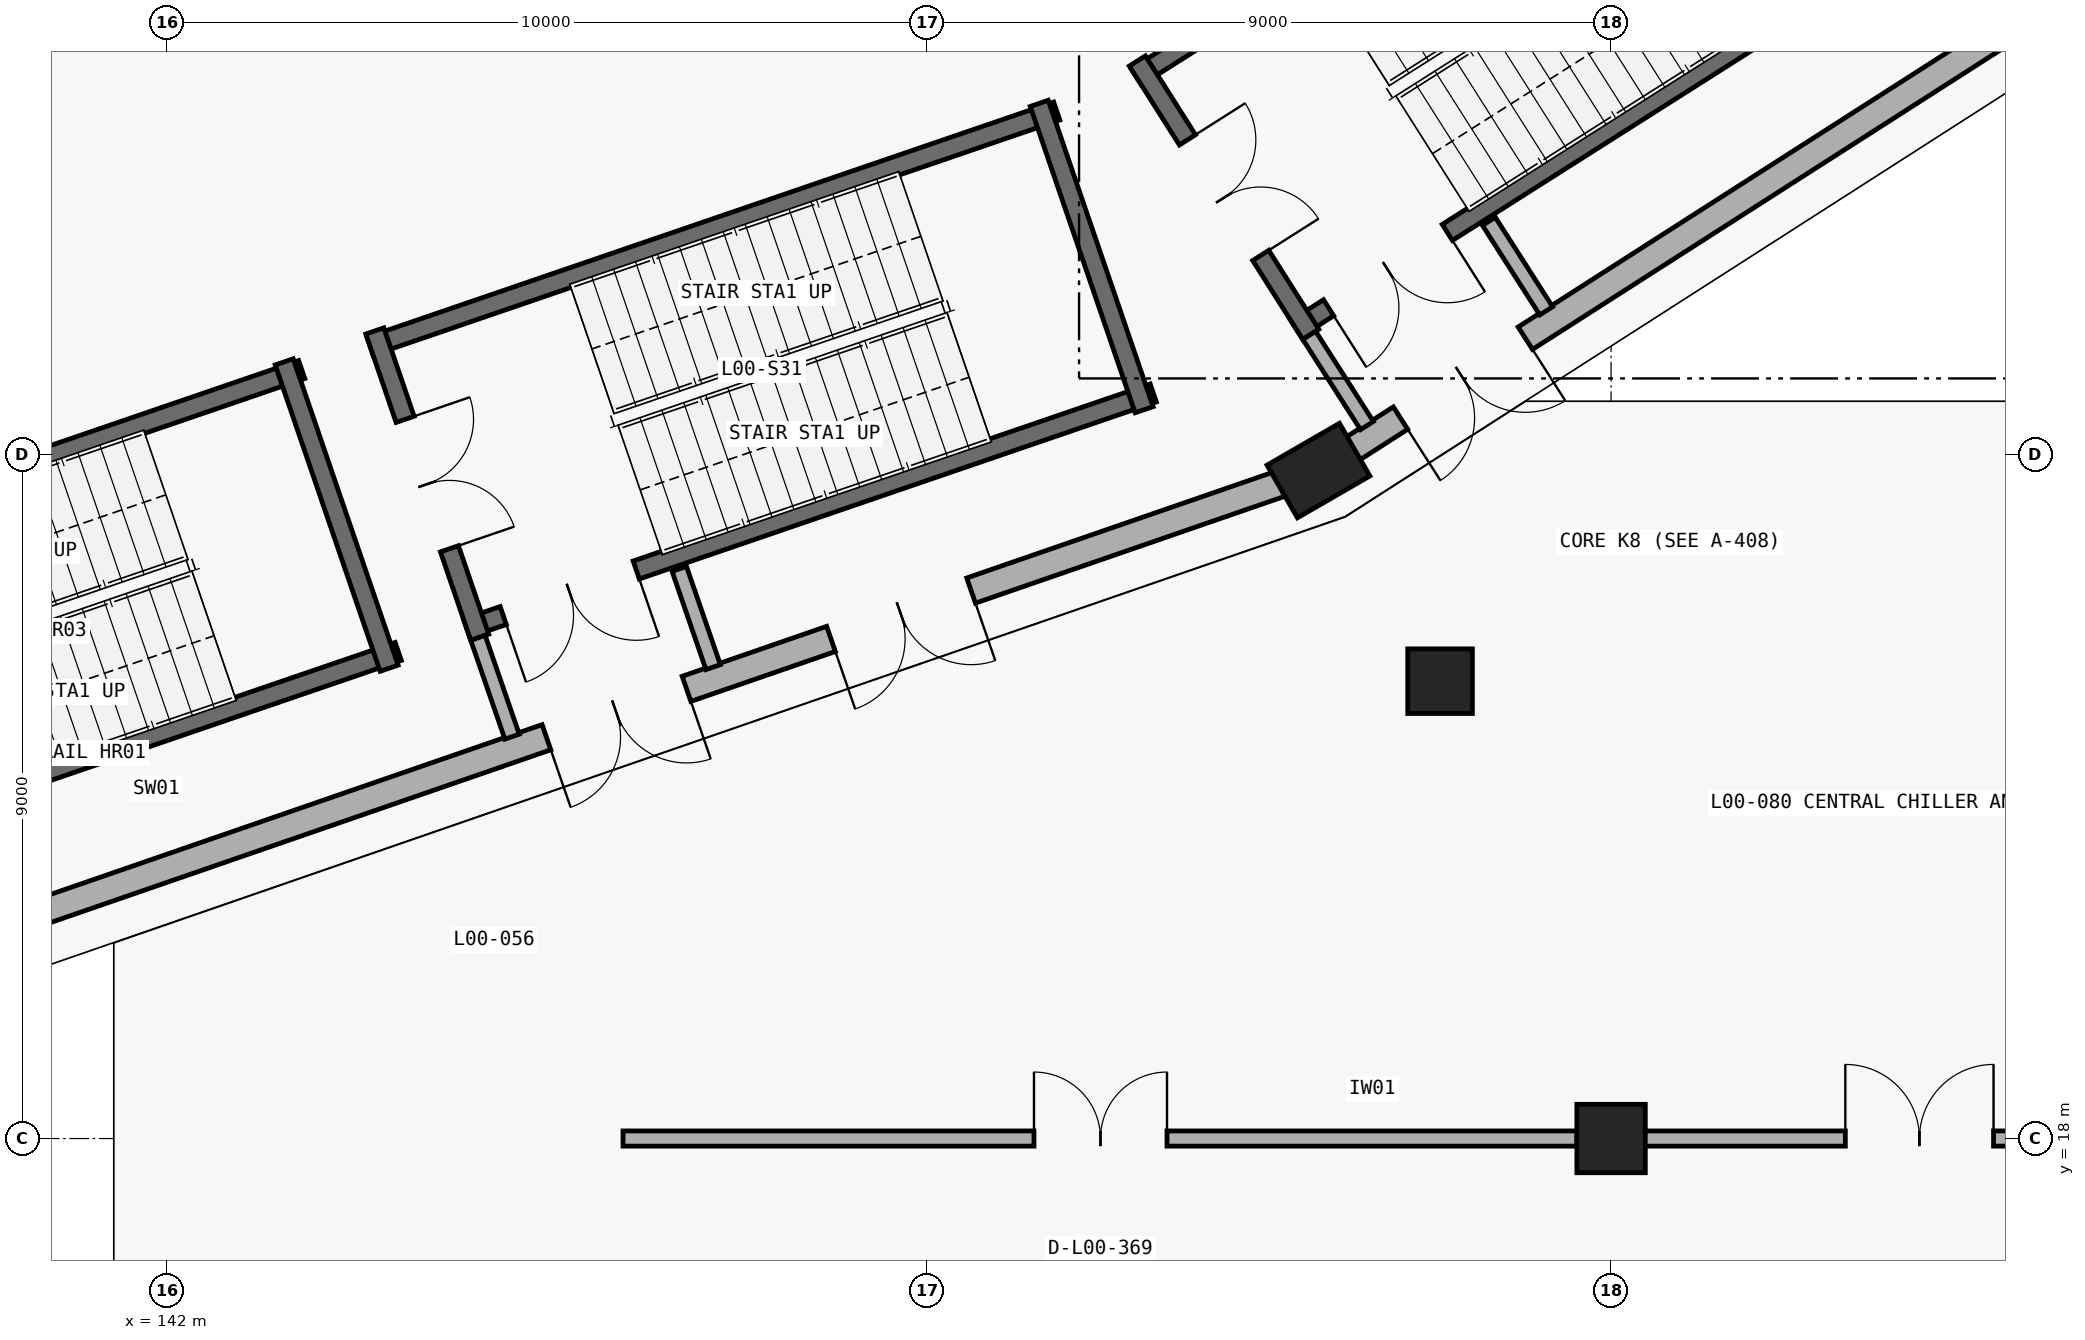
"""IFC4 building model, lengths in metres.
Left out: names, types, materials, properties, quantities, classifications, styles, units other than length and angle.
Written with IfcOpenShell. Run it as: python <this file> out.ifc"""

import sys

from ifc_helpers import new_model, si_unit, direction, frame, frame_2d, origin, origin_2d, place, context, subcontext, project, spatial, rectangle, circle, extrude, element, fill, save


model = new_model("IFC4")
c1 = context("Model", 3, precision=1e-05, world=origin(), true_north=direction((0.0, 1.0)))
c2 = subcontext(c1, "Body", "Model", "MODEL_VIEW")
j1 = project(units=[si_unit("LENGTHUNIT", "METRE"), si_unit("PLANEANGLEUNIT", "RADIAN")], contexts=[c1])
p1 = place(None, origin())
s1 = spatial("IfcSite", under=j1, at=p1, CompositionType="ELEMENT")
p2 = place(p1, origin())
s2 = spatial("IfcBuilding", under=s1, at=p2, CompositionType="ELEMENT")
p3 = place(p2, origin())
s3 = spatial("IfcBuildingStorey", under=s2, at=p3, CompositionType="ELEMENT", Elevation=0.0)
p4 = place(p3, frame((157.15, 26.788, 0.0), z_axis=(0.0, 0.0, 1.0), x_axis=(-0.5, 0.866025403784, 0.0)))
e1 = element("IfcColumn", 1, at=p4, inside=s3, PredefinedType="COLUMN", context=c2, shape_type="SweptSolid", body=[
    extrude(rectangle(XDim=0.8, YDim=1.1, at=origin_2d()), origin(), (0.0, 0.0, 1.0), 5.4),
])
p5 = place(p3, frame((158.75, 24.017, 0.0), z_axis=(0.0, 0.0, 1.0), x_axis=(1.0, 0.0, 0.0)))
e2 = element("IfcColumn", 2, at=p5, inside=s3, PredefinedType="COLUMN", context=c2, shape_type="SweptSolid", body=[
    extrude(circle(Radius=0.425, at=origin_2d()), origin(), (0.0, 0.0, 1.0), 5.4),
])
p6 = place(p3, frame((161.0, 18.0, 0.0), z_axis=(0.0, 0.0, 1.0), x_axis=(1.0, 0.0, 0.0)))
e3 = element("IfcColumn", 3, at=p6, inside=s3, PredefinedType="COLUMN", context=c2, shape_type="SweptSolid", body=[
    extrude(rectangle(XDim=0.9, YDim=0.9, at=origin_2d()), origin(), (0.0, 0.0, 1.0), 5.4),
])
p7 = place(p3, frame((156.644, 26.613, 0.0), z_axis=(0.0, 0.0, 1.0), x_axis=(-0.945215757663, -0.326446276538, 0.0)))
e4 = element("IfcWall", 4, at=p7, inside=s3, PredefinedType="STANDARD", context=c2, shape_type="SweptSolid", body=[
    extrude(rectangle(XDim=21.979, YDim=0.35, at=frame_2d((10.99, 0.0))), origin(), (0.0, 0.0, 1.0), 4.165),
])
p8 = place(p7, frame((18.761, 0.0, 0.0)))
e5 = element("IfcOpeningElement", 5, at=p8, cuts=e4, PredefinedType="OPENING", context=c2, shape_type="SweptSolid", body=[
    extrude(rectangle(XDim=1.95, YDim=2.25, at=frame_2d((0.975, 1.125))), frame((0.0, 0.185, 0.0), z_axis=(0.0, -1.0, 0.0), x_axis=(1.0, 0.0, 0.0)), (0.0, 0.0, 1.0), 0.37),
])
p9 = place(p7, frame((8.261, 0.0, 0.0)))
e6 = element("IfcOpeningElement", 6, at=p9, cuts=e4, PredefinedType="OPENING", context=c2, shape_type="SweptSolid", body=[
    extrude(rectangle(XDim=1.95, YDim=2.25, at=frame_2d((0.975, 1.125))), frame((0.0, 0.185, 0.0), z_axis=(0.0, -1.0, 0.0), x_axis=(1.0, 0.0, 0.0)), (0.0, 0.0, 1.0), 0.37),
])
p10 = place(p7, frame((4.3, 0.0, 0.0)))
e7 = element("IfcOpeningElement", 7, at=p10, cuts=e4, PredefinedType="OPENING", context=c2, shape_type="SweptSolid", body=[
    extrude(rectangle(XDim=1.95, YDim=2.25, at=frame_2d((0.975, 1.125))), frame((0.0, 0.185, 0.0), z_axis=(0.0, -1.0, 0.0), x_axis=(1.0, 0.0, 0.0)), (0.0, 0.0, 1.0), 0.37),
])
p11 = place(p3, frame((175.399, 38.465, 0.0), z_axis=(0.0, 0.0, 1.0), x_axis=(-0.842308733224, -0.538995359845, 0.0)))
e8 = element("IfcWall", 8, at=p11, inside=s3, PredefinedType="STANDARD", context=c2, shape_type="SweptSolid", body=[
    extrude(rectangle(XDim=21.139, YDim=0.35, at=frame_2d((10.57, 0.0))), origin(), (0.0, 0.0, 1.0), 4.165),
])
p12 = place(p11, frame((18.434, 0.0, 0.0)))
e9 = element("IfcOpeningElement", 9, at=p12, cuts=e8, PredefinedType="OPENING", context=c2, shape_type="SweptSolid", body=[
    extrude(rectangle(XDim=1.95, YDim=2.25, at=frame_2d((0.975, 1.125))), frame((0.0, 0.185, 0.0), z_axis=(0.0, -1.0, 0.0), x_axis=(1.0, 0.0, 0.0)), (0.0, 0.0, 1.0), 0.37),
])
p13 = place(p11, frame((7.935, 0.0, 0.0)))
e10 = element("IfcOpeningElement", 10, at=p13, cuts=e8, PredefinedType="OPENING", context=c2, shape_type="SweptSolid", body=[
    extrude(rectangle(XDim=1.95, YDim=2.25, at=frame_2d((0.975, 1.125))), frame((0.0, 0.185, 0.0), z_axis=(0.0, -1.0, 0.0), x_axis=(1.0, 0.0, 0.0)), (0.0, 0.0, 1.0), 0.37),
])
p14 = place(p11, frame((4.098, 0.0, 0.0)))
e11 = element("IfcOpeningElement", 11, at=p14, cuts=e8, PredefinedType="OPENING", context=c2, shape_type="SweptSolid", body=[
    extrude(rectangle(XDim=1.95, YDim=2.25, at=frame_2d((0.975, 1.125))), frame((0.0, 0.185, 0.0), z_axis=(0.0, -1.0, 0.0), x_axis=(1.0, 0.0, 0.0)), (0.0, 0.0, 1.0), 0.37),
])
p15 = place(p3, frame((145.042, 24.408, 0.0), z_axis=(0.0, 0.0, 1.0), x_axis=(-0.946064424228, -0.323978556712, 0.0)))
e12 = element("IfcWall", 12, at=p15, inside=s3, PredefinedType="SHEAR", context=c2, shape_type="SweptSolid", body=[
    extrude(rectangle(XDim=9.55, YDim=0.25, at=frame_2d((4.775, 0.0))), origin(), (0.0, 0.0, 1.0), 5.1),
])
p16 = place(p15, frame((7.19, 0.0, 0.0)))
e13 = element("IfcOpeningElement", 13, at=p16, cuts=e12, PredefinedType="OPENING", context=c2, shape_type="SweptSolid", body=[
    extrude(rectangle(XDim=1.85, YDim=2.3, at=frame_2d((0.925, 1.15))), frame((0.0, 0.135, 0.0), z_axis=(0.0, -1.0, 0.0), x_axis=(1.0, 0.0, 0.0)), (0.0, 0.0, 1.0), 0.27),
])
p17 = place(p3, frame((143.772, 28.117, 0.0), z_axis=(0.0, 0.0, 1.0), x_axis=(-0.946067107432, -0.323970721263, 0.0)))
e14 = element("IfcWall", 14, at=p17, inside=s3, PredefinedType="SHEAR", context=c2, shape_type="SweptSolid", body=[
    extrude(rectangle(XDim=9.55, YDim=0.25, at=frame_2d((4.775, 0.0))), origin(), (0.0, 0.0, 1.0), 5.1),
])
p18 = place(p3, frame((144.922, 24.188, 0.0), z_axis=(0.0, 0.0, 1.0), x_axis=(-0.323971192516, 0.946066946056, 0.0)))
e15 = element("IfcWall", 15, at=p18, inside=s3, PredefinedType="SHEAR", context=c2, shape_type="SweptSolid", body=[
    extrude(rectangle(XDim=4.26, YDim=0.25, at=frame_2d((2.13, 0.0))), origin(), (0.0, 0.0, 1.0), 5.1),
])
p19 = place(p3, frame((164.917, 33.773, 0.0), z_axis=(0.0, 0.0, 1.0), x_axis=(-0.844391246241, -0.535727004427, 0.0)))
e16 = element("IfcWall", 16, at=p19, inside=s3, PredefinedType="SHEAR", context=c2, shape_type="SweptSolid", body=[
    extrude(rectangle(XDim=9.55, YDim=0.25, at=frame_2d((4.775, 0.0))), origin(), (0.0, 0.0, 1.0), 5.1),
])
p20 = place(p19, frame((7.19, 0.0, 0.0)))
e17 = element("IfcOpeningElement", 17, at=p20, cuts=e16, PredefinedType="OPENING", context=c2, shape_type="SweptSolid", body=[
    extrude(rectangle(XDim=1.85, YDim=2.3, at=frame_2d((0.925, 1.15))), frame((0.0, 0.135, 0.0), z_axis=(0.0, -1.0, 0.0), x_axis=(1.0, 0.0, 0.0)), (0.0, 0.0, 1.0), 0.27),
])
p21 = place(p3, frame((162.817, 37.083, 0.0), z_axis=(0.0, 0.0, 1.0), x_axis=(-0.844391246241, -0.535727004427, 0.0)))
e18 = element("IfcWall", 18, at=p21, inside=s3, PredefinedType="SHEAR", context=c2, shape_type="SweptSolid", body=[
    extrude(rectangle(XDim=9.55, YDim=0.25, at=frame_2d((4.775, 0.0))), origin(), (0.0, 0.0, 1.0), 5.1),
])
p22 = place(p3, frame((154.767, 32.177, 0.0), z_axis=(0.0, 0.0, 1.0), x_axis=(0.535684577572, -0.844418162613, 0.0)))
e19 = element("IfcWall", 19, at=p22, inside=s3, PredefinedType="SHEAR", context=c2, shape_type="SweptSolid", body=[
    extrude(rectangle(XDim=4.26, YDim=0.25, at=frame_2d((2.13, 0.0))), origin(), (0.0, 0.0, 1.0), 5.1),
])
p23 = place(p22, frame((1.23, 0.0, 0.0)))
e20 = element("IfcOpeningElement", 20, at=p23, cuts=e19, PredefinedType="OPENING", context=c2, shape_type="SweptSolid", body=[
    extrude(rectangle(XDim=1.8, YDim=2.25, at=frame_2d((0.9, 1.125))), frame((0.0, 0.135, 0.0), z_axis=(0.0, -1.0, 0.0), x_axis=(1.0, 0.0, 0.0)), (0.0, 0.0, 1.0), 0.27),
])
p24 = place(p3, frame((154.976, 27.809, 0.0), z_axis=(0.0, 0.0, 1.0), x_axis=(-0.946064424228, -0.323978556712, 0.0)))
e21 = element("IfcWall", 21, at=p24, inside=s3, PredefinedType="SHEAR", context=c2, shape_type="SweptSolid", body=[
    extrude(rectangle(XDim=9.55, YDim=0.25, at=frame_2d((4.775, 0.0))), origin(), (0.0, 0.0, 1.0), 5.1),
])
p25 = place(p24, frame((7.19, 0.0, 0.0)))
e22 = element("IfcOpeningElement", 22, at=p25, cuts=e21, PredefinedType="OPENING", context=c2, shape_type="SweptSolid", body=[
    extrude(rectangle(XDim=1.85, YDim=2.3, at=frame_2d((0.925, 1.15))), frame((0.0, 0.135, 0.0), z_axis=(0.0, -1.0, 0.0), x_axis=(1.0, 0.0, 0.0)), (0.0, 0.0, 1.0), 0.27),
])
p26 = place(p3, frame((153.706, 31.518, 0.0), z_axis=(0.0, 0.0, 1.0), x_axis=(-0.946064424228, -0.323978556712, 0.0)))
e23 = element("IfcWall", 23, at=p26, inside=s3, PredefinedType="SHEAR", context=c2, shape_type="SweptSolid", body=[
    extrude(rectangle(XDim=9.55, YDim=0.25, at=frame_2d((4.775, 0.0))), origin(), (0.0, 0.0, 1.0), 5.1),
])
p27 = place(p3, frame((144.735, 28.625, 0.0), z_axis=(0.0, 0.0, 1.0), x_axis=(0.323971192516, -0.946066946056, 0.0)))
e24 = element("IfcWall", 24, at=p27, inside=s3, PredefinedType="SHEAR", context=c2, shape_type="SweptSolid", body=[
    extrude(rectangle(XDim=4.26, YDim=0.25, at=frame_2d((2.13, 0.0))), origin(), (0.0, 0.0, 1.0), 5.1),
])
p28 = place(p27, frame((1.23, 0.0, 0.0)))
e25 = element("IfcOpeningElement", 25, at=p28, cuts=e24, PredefinedType="OPENING", context=c2, shape_type="SweptSolid", body=[
    extrude(rectangle(XDim=1.8, YDim=2.25, at=frame_2d((0.9, 1.125))), frame((0.0, 0.135, 0.0), z_axis=(0.0, -1.0, 0.0), x_axis=(1.0, 0.0, 0.0)), (0.0, 0.0, 1.0), 0.27),
])
p29 = place(p3, frame((154.856, 27.589, 0.0), z_axis=(0.0, 0.0, 1.0), x_axis=(-0.323988758717, 0.946060930504, 0.0)))
e26 = element("IfcWall", 26, at=p29, inside=s3, PredefinedType="SHEAR", context=c2, shape_type="SweptSolid", body=[
    extrude(rectangle(XDim=4.26, YDim=0.25, at=frame_2d((2.13, 0.0))), origin(), (0.0, 0.0, 1.0), 5.1),
])
p30 = place(p3, frame((157.028, 28.567, 0.0), z_axis=(0.0, 0.0, 1.0), x_axis=(0.539171685924, -0.842195875731, 0.0)))
e27 = element("IfcWall", 27, at=p30, inside=s3, PredefinedType="PARTITIONING", context=c2, shape_type="SweptSolid", body=[
    extrude(rectangle(XDim=1.409, YDim=0.2, at=frame_2d((0.705, 0.0))), origin(), (0.0, 0.0, 1.0), 4.165),
])
p31 = place(p3, frame((159.393, 30.067, 0.0), z_axis=(0.0, 0.0, 1.0), x_axis=(0.538885207577, -0.842379209771, 0.0)))
e28 = element("IfcWall", 28, at=p31, inside=s3, PredefinedType="PARTITIONING", context=c2, shape_type="SweptSolid", body=[
    extrude(rectangle(XDim=1.398, YDim=0.2, at=frame_2d((0.699, 0.0))), origin(), (0.0, 0.0, 1.0), 4.165),
])
p32 = place(p3, frame((146.091, 24.587, 0.0), z_axis=(0.0, 0.0, 1.0), x_axis=(0.326488531048, -0.945201163295, 0.0)))
e29 = element("IfcWall", 29, at=p32, inside=s3, PredefinedType="PARTITIONING", context=c2, shape_type="SweptSolid", body=[
    extrude(rectangle(XDim=1.375, YDim=0.2, at=frame_2d((0.688, 0.0))), origin(), (0.0, 0.0, 1.0), 4.165),
])
p33 = place(p3, frame((148.74, 25.494, 0.0), z_axis=(0.0, 0.0, 1.0), x_axis=(0.326337459961, -0.945253332301, 0.0)))
e30 = element("IfcWall", 30, at=p33, inside=s3, PredefinedType="PARTITIONING", context=c2, shape_type="SweptSolid", body=[
    extrude(rectangle(XDim=1.367, YDim=0.2, at=frame_2d((0.683, 0.0))), origin(), (0.0, 0.0, 1.0), 4.165),
])
p34 = place(p3, frame((148.0, 18.0, 0.0), z_axis=(0.0, 0.0, 1.0), x_axis=(1.0, 0.0, 0.0)))
e31 = element("IfcWall", 31, at=p34, inside=s3, PredefinedType="PARTITIONING", context=c2, shape_type="SweptSolid", body=[
    extrude(rectangle(XDim=12.565, YDim=0.2, at=frame_2d((6.282, 0.0))), origin(), (0.0, 0.0, 1.0), 5.08),
])
p35 = place(p34, frame((5.407, 0.0, 0.0)))
e32 = element("IfcOpeningElement", 32, at=p35, cuts=e31, PredefinedType="OPENING", context=c2, shape_type="SweptSolid", body=[
    extrude(rectangle(XDim=1.75, YDim=2.3, at=frame_2d((0.875, 1.15))), frame((0.0, 0.11, 0.0), z_axis=(0.0, -1.0, 0.0), x_axis=(1.0, 0.0, 0.0)), (0.0, 0.0, 1.0), 0.22),
])
p36 = place(p3, frame((160.55, 18.0, 0.0), z_axis=(0.0, 0.0, 1.0), x_axis=(1.0, 0.0, 0.0)))
e33 = element("IfcWall", 33, at=p36, inside=s3, PredefinedType="PARTITIONING", context=c2, shape_type="SweptSolid", body=[
    extrude(rectangle(XDim=9.015, YDim=0.2, at=frame_2d((4.507, 0.0))), origin(), (0.0, 0.0, 1.0), 4.384),
])
p37 = place(p36, frame((3.532, 0.0, 0.0)))
e34 = element("IfcOpeningElement", 34, at=p37, cuts=e33, PredefinedType="OPENING", context=c2, shape_type="SweptSolid", body=[
    extrude(rectangle(XDim=1.95, YDim=2.35, at=frame_2d((0.975, 1.175))), frame((0.0, 0.11, 0.0), z_axis=(0.0, -1.0, 0.0), x_axis=(1.0, 0.0, 0.0)), (0.0, 0.0, 1.0), 0.22),
])
p38 = place(p9, origin())
e35 = element("IfcDoor", 35, at=p38, inside=s3, OperationType="DOUBLE_DOOR_SINGLE_SWING", PredefinedType="DOOR", context=c2, shape_type="SweptSolid", body=[
    extrude(rectangle(XDim=1.95, YDim=2.25, at=frame_2d((0.975, 1.125))), frame((0.0, 0.025, 0.0), z_axis=(0.0, -1.0, 0.0), x_axis=(1.0, 0.0, 0.0)), (0.0, 0.0, 1.0), 0.05),
])
fill(e6, e35)
p39 = place(p10, origin())
e36 = element("IfcDoor", 36, at=p39, inside=s3, OperationType="DOUBLE_DOOR_SINGLE_SWING", PredefinedType="DOOR", context=c2, shape_type="SweptSolid", body=[
    extrude(rectangle(XDim=1.95, YDim=2.25, at=frame_2d((0.975, 1.125))), frame((0.0, 0.025, 0.0), z_axis=(0.0, -1.0, 0.0), x_axis=(1.0, 0.0, 0.0)), (0.0, 0.0, 1.0), 0.05),
])
fill(e7, e36)
p40 = place(p12, origin())
e37 = element("IfcDoor", 37, at=p40, inside=s3, OperationType="DOUBLE_DOOR_SINGLE_SWING", PredefinedType="DOOR", context=c2, shape_type="SweptSolid", body=[
    extrude(rectangle(XDim=1.95, YDim=2.25, at=frame_2d((0.975, 1.125))), frame((0.0, 0.025, 0.0), z_axis=(0.0, -1.0, 0.0), x_axis=(1.0, 0.0, 0.0)), (0.0, 0.0, 1.0), 0.05),
])
fill(e9, e37)
p41 = place(p23, origin())
e38 = element("IfcDoor", 38, at=p41, inside=s3, OperationType="DOUBLE_DOOR_SINGLE_SWING", PredefinedType="DOOR", context=c2, shape_type="SweptSolid", body=[
    extrude(rectangle(XDim=1.8, YDim=2.25, at=frame_2d((0.9, 1.125))), frame((0.0, 0.025, 0.0), z_axis=(0.0, -1.0, 0.0), x_axis=(1.0, 0.0, 0.0)), (0.0, 0.0, 1.0), 0.05),
])
fill(e20, e38)
p42 = place(p20, origin())
e39 = element("IfcDoor", 39, at=p42, inside=s3, OperationType="DOUBLE_DOOR_SINGLE_SWING", PredefinedType="DOOR", context=c2, shape_type="SweptSolid", body=[
    extrude(rectangle(XDim=1.85, YDim=2.3, at=frame_2d((0.925, 1.15))), frame((0.0, 0.025, 0.0), z_axis=(0.0, -1.0, 0.0), x_axis=(1.0, 0.0, 0.0)), (0.0, 0.0, 1.0), 0.05),
])
fill(e17, e39)
p43 = place(p28, origin())
e40 = element("IfcDoor", 40, at=p43, inside=s3, OperationType="DOUBLE_DOOR_SINGLE_SWING", PredefinedType="DOOR", context=c2, shape_type="SweptSolid", body=[
    extrude(rectangle(XDim=1.8, YDim=2.25, at=frame_2d((0.9, 1.125))), frame((0.0, 0.025, 0.0), z_axis=(0.0, -1.0, 0.0), x_axis=(1.0, 0.0, 0.0)), (0.0, 0.0, 1.0), 0.05),
])
fill(e25, e40)
p44 = place(p25, origin())
e41 = element("IfcDoor", 41, at=p44, inside=s3, OperationType="DOUBLE_DOOR_SINGLE_SWING", PredefinedType="DOOR", context=c2, shape_type="SweptSolid", body=[
    extrude(rectangle(XDim=1.85, YDim=2.3, at=frame_2d((0.925, 1.15))), frame((0.0, 0.025, 0.0), z_axis=(0.0, -1.0, 0.0), x_axis=(1.0, 0.0, 0.0)), (0.0, 0.0, 1.0), 0.05),
])
fill(e22, e41)
p45 = place(p35, origin())
e42 = element("IfcDoor", 42, at=p45, inside=s3, OperationType="DOUBLE_DOOR_SINGLE_SWING", PredefinedType="DOOR", context=c2, shape_type="SweptSolid", body=[
    extrude(rectangle(XDim=1.75, YDim=2.3, at=frame_2d((0.875, 1.15))), frame((0.0, 0.025, 0.0), z_axis=(0.0, -1.0, 0.0), x_axis=(1.0, 0.0, 0.0)), (0.0, 0.0, 1.0), 0.05),
])
fill(e32, e42)
p46 = place(p37, origin())
e43 = element("IfcDoor", 43, at=p46, inside=s3, OperationType="DOUBLE_DOOR_SINGLE_SWING", PredefinedType="DOOR", context=c2, shape_type="SweptSolid", body=[
    extrude(rectangle(XDim=1.95, YDim=2.35, at=frame_2d((0.975, 1.175))), frame((0.0, 0.025, 0.0), z_axis=(0.0, -1.0, 0.0), x_axis=(1.0, 0.0, 0.0)), (0.0, 0.0, 1.0), 0.05),
])
fill(e34, e43)
save(model, sys.argv[1])
